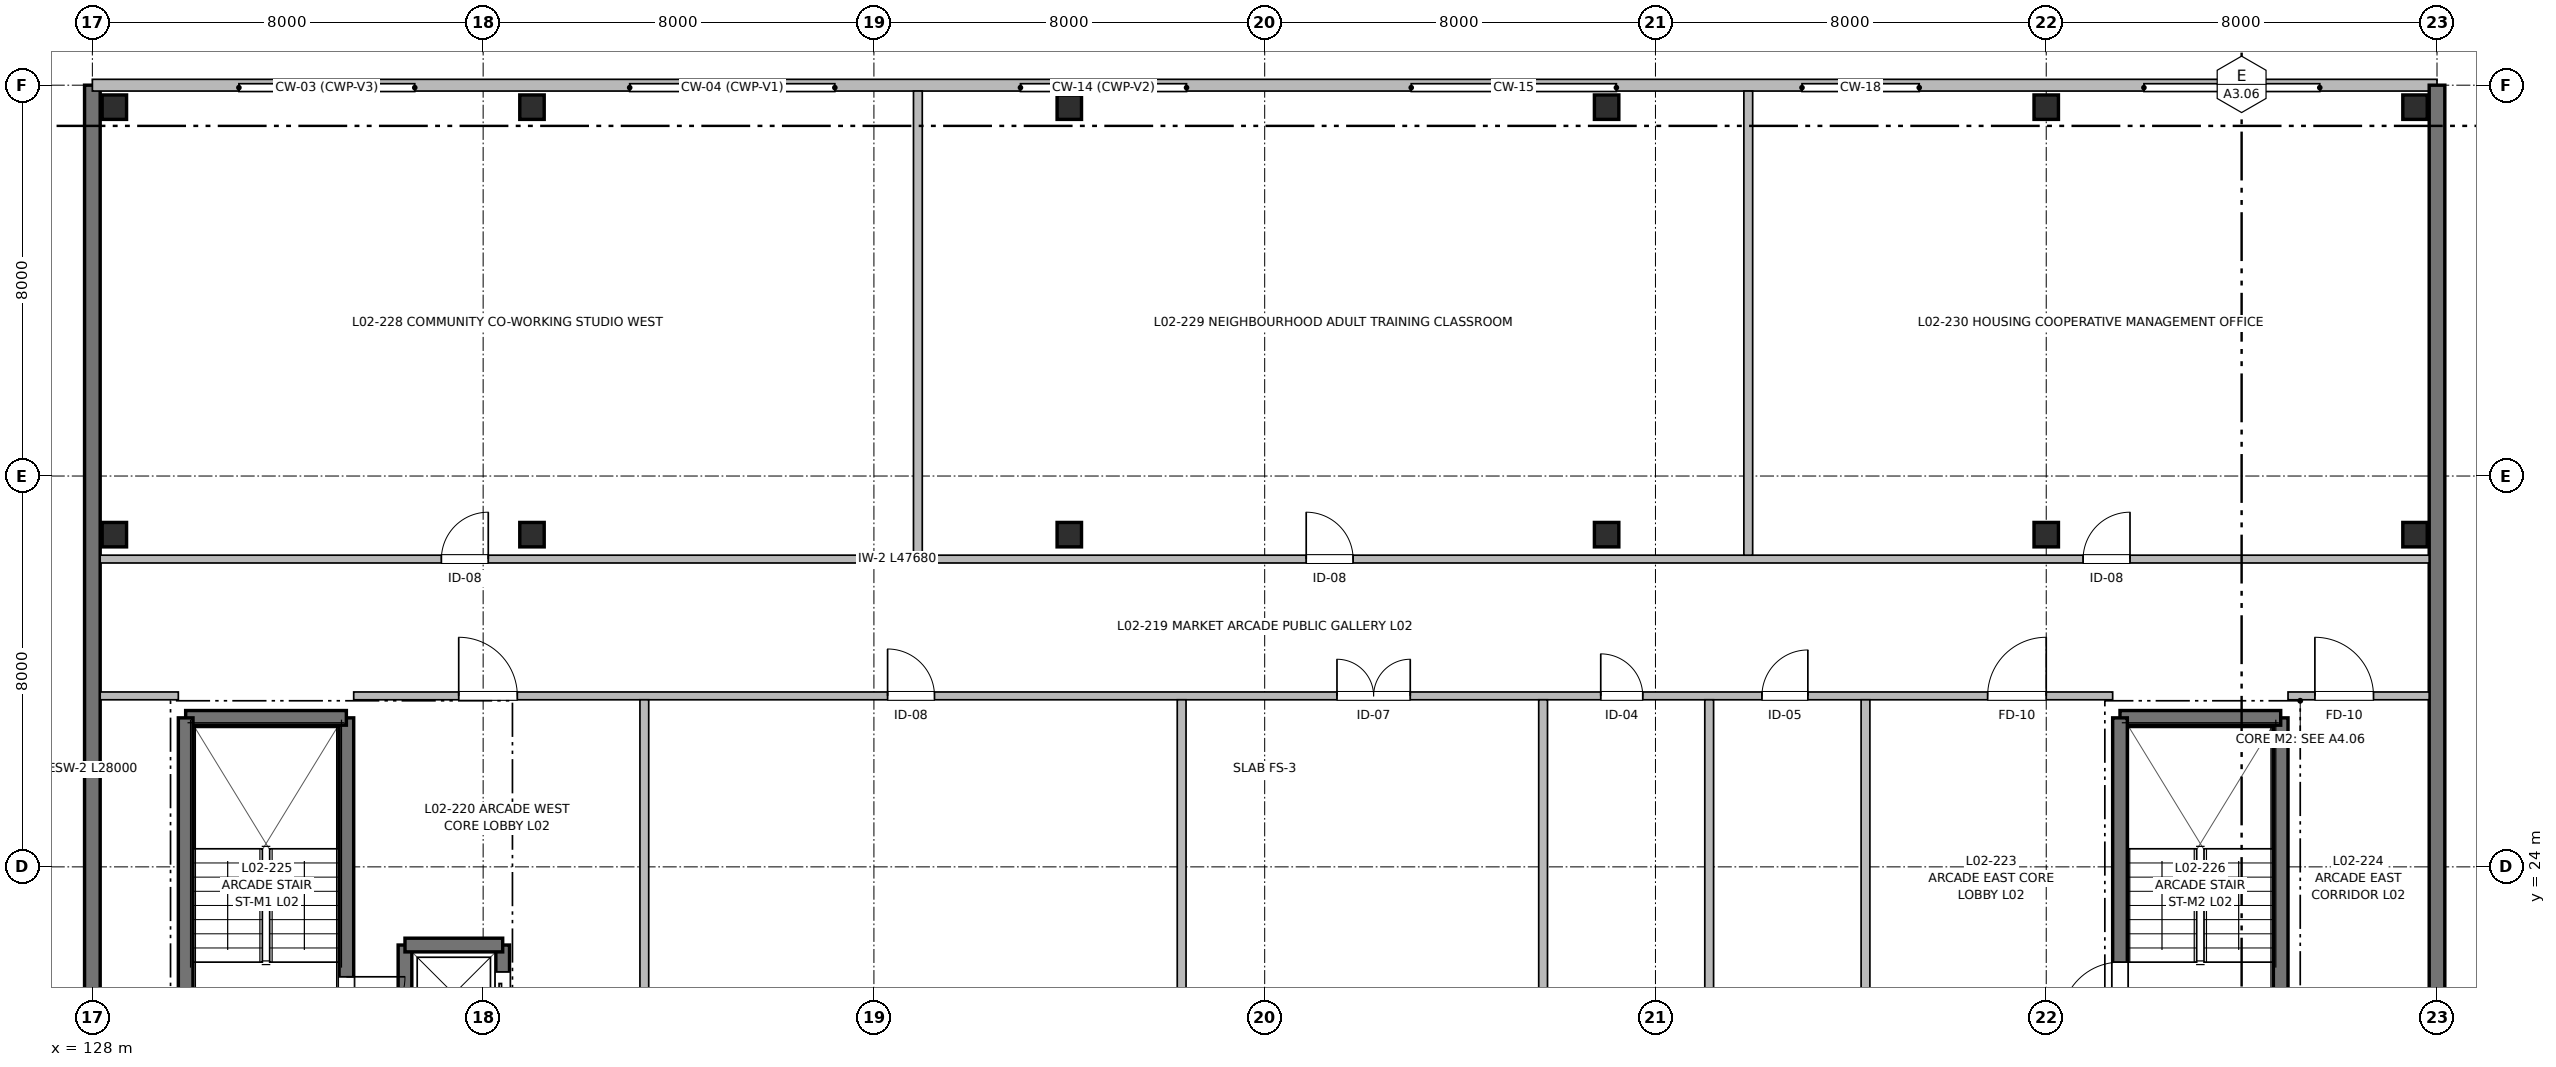
"""IFC4 building model, lengths in metres.
Left out: names, types, materials, properties, quantities, classifications, styles, units other than length and angle.
Written with IfcOpenShell. Run it as: python <this file> out.ifc"""

import sys

from ifc_helpers import new_model, si_unit, direction, frame, frame_2d, origin, origin_2d, place, context, subcontext, project, spatial, rectangle, extrude, element, fill, save


model = new_model("IFC4")
c1 = context("Model", 3, precision=1e-05, world=origin(), true_north=direction((0.0, 1.0)))
c2 = subcontext(c1, "Body", "Model", "MODEL_VIEW")
j1 = project(units=[si_unit("LENGTHUNIT", "METRE"), si_unit("PLANEANGLEUNIT", "RADIAN")], contexts=[c1])
p1 = place(None, origin())
s1 = spatial("IfcSite", under=j1, at=p1, CompositionType="ELEMENT")
p2 = place(p1, origin())
s2 = spatial("IfcBuilding", under=s1, at=p2, CompositionType="ELEMENT")
p3 = place(p2, frame((0.0, 0.0, 7.36)))
s3 = spatial("IfcBuildingStorey", under=s2, at=p3, CompositionType="ELEMENT", Elevation=7.36)
for number, where, z_axis, x_axis in (
    (1, (128.45, 30.8, 0.0), (0.0, 0.0, 1.0), (1.0, 0.0, 0.0)),
    (2, (128.45, 39.55, 0.0), (0.0, 0.0, 1.0), (1.0, 0.0, 0.0)),
    (3, (137.0, 30.8, 0.0), (0.0, 0.0, 1.0), (1.0, 0.0, 0.0)),
    (4, (137.0, 39.55, 0.0), (0.0, 0.0, 1.0), (1.0, 0.0, 0.0)),
    (5, (148.0, 30.8, 0.0), (0.0, 0.0, 1.0), (1.0, 0.0, 0.0)),
    (6, (148.0, 39.55, 0.0), (0.0, 0.0, 1.0), (1.0, 0.0, 0.0)),
    (7, (159.0, 30.8, 0.0), (0.0, 0.0, 1.0), (1.0, 0.0, 0.0)),
    (8, (159.0, 39.55, 0.0), (0.0, 0.0, 1.0), (1.0, 0.0, 0.0)),
    (9, (168.0, 30.8, 0.0), (0.0, 0.0, 1.0), (1.0, 0.0, 0.0)),
    (10, (168.0, 39.55, 0.0), (0.0, 0.0, 1.0), (1.0, 0.0, 0.0)),
    (11, (175.55, 30.8, 0.0), (0.0, 0.0, 1.0), (1.0, 0.0, 0.0)),
    (12, (175.55, 39.55, 0.0), (0.0, 0.0, 1.0), (1.0, 0.0, 0.0)),
):
    element("IfcColumn", number, at=place(p3, frame(where, z_axis=z_axis, x_axis=x_axis)), inside=s3, PredefinedType="COLUMN", context=c2, shape_type="SweptSolid", body=[
        extrude(rectangle(XDim=0.5, YDim=0.5, at=origin_2d()), origin(), (0.0, 0.0, 1.0), 3.2),
    ])
p4 = place(p3, frame((128.0, 12.0, 0.0), z_axis=(0.0, 0.0, 1.0), x_axis=(0.0, 1.0, 0.0)))
e13 = element("IfcWall", 13, at=p4, inside=s3, PredefinedType="SHEAR", context=c2, shape_type="SweptSolid", body=[
    extrude(rectangle(XDim=28.0, YDim=0.32, at=frame_2d((14.0, 0.0))), origin(), (0.0, 0.0, 1.0), 2.95),
])
p5 = place(p3, frame((128.0, 40.0, 0.0), z_axis=(0.0, 0.0, 1.0), x_axis=(1.0, 0.0, 0.0)))
e14 = element("IfcWall", 14, at=p5, inside=s3, PredefinedType="SOLIDWALL", context=c2, shape_type="SweptSolid", body=[
    extrude(rectangle(XDim=48.0, YDim=0.24, at=frame_2d((24.0, 0.0))), origin(), (0.0, 0.0, 1.0), 2.95),
])
p6 = place(p3, frame((176.0, 40.0, 0.0), z_axis=(0.0, 0.0, 1.0), x_axis=(0.0, -1.0, 0.0)))
e15 = element("IfcWall", 15, at=p6, inside=s3, PredefinedType="SHEAR", context=c2, shape_type="SweptSolid", body=[
    extrude(rectangle(XDim=28.0, YDim=0.32, at=frame_2d((14.0, 0.0))), origin(), (0.0, 0.0, 1.0), 2.95),
])
p7 = place(p3, frame((136.4, 20.4, 0.0), z_axis=(0.0, 0.0, 1.0), x_axis=(0.0, 1.0, 0.0)))
e16 = element("IfcWall", 16, at=p7, inside=s3, PredefinedType="SHEAR", context=c2, shape_type="SweptSolid", body=[
    extrude(rectangle(XDim=2.0, YDim=0.28, at=frame_2d((1.0, 0.0))), origin(), (0.0, 0.0, 1.0), 2.95),
])
p8 = place(p7, frame((0.5, 0.0, 0.0)))
e17 = element("IfcOpeningElement", 17, at=p8, cuts=e16, PredefinedType="OPENING", context=c2, shape_type="SweptSolid", body=[
    extrude(rectangle(XDim=0.95, YDim=2.15, at=frame_2d((0.475, 1.075))), frame((0.0, 0.15, 0.0), z_axis=(0.0, -1.0, 0.0), x_axis=(1.0, 0.0, 0.0)), (0.0, 0.0, 1.0), 0.3),
])
for number, where, z_axis, x_axis in (
    (18, (134.4, 20.4, 0.0), (0.0, 0.0, 1.0), (0.0, 1.0, 0.0)),
    (19, (134.4, 22.4, 0.0), (0.0, 0.0, 1.0), (1.0, 0.0, 0.0)),
):
    element("IfcWall", number, at=place(p3, frame(where, z_axis=z_axis, x_axis=x_axis)), inside=s3, PredefinedType="SHEAR", context=c2, shape_type="SweptSolid", body=[
        extrude(rectangle(XDim=2.0, YDim=0.28, at=frame_2d((1.0, 0.0))), origin(), (0.0, 0.0, 1.0), 2.95),
    ])
p9 = place(p3, frame((133.2, 27.05, 0.0), z_axis=(0.0, 0.0, 1.0), x_axis=(0.0, -1.0, 0.0)))
e20 = element("IfcWall", 20, at=p9, inside=s3, PredefinedType="SHEAR", context=c2, shape_type="SweptSolid", body=[
    extrude(rectangle(XDim=6.9, YDim=0.3, at=frame_2d((3.45, 0.0))), origin(), (0.0, 0.0, 1.0), 3.2),
])
p10 = place(p9, frame((5.3, 0.0, 0.0)))
e21 = element("IfcOpeningElement", 21, at=p10, cuts=e20, PredefinedType="OPENING", context=c2, shape_type="SweptSolid", body=[
    extrude(rectangle(XDim=1.2, YDim=2.2, at=frame_2d((0.6, 1.1))), frame((0.0, 0.16, 0.0), z_axis=(0.0, -1.0, 0.0), x_axis=(1.0, 0.0, 0.0)), (0.0, 0.0, 1.0), 0.32),
])
p11 = place(p3, frame((129.91, 27.05, 0.0), z_axis=(0.0, 0.0, 1.0), x_axis=(1.0, 0.0, 0.0)))
e22 = element("IfcWall", 22, at=p11, inside=s3, PredefinedType="SHEAR", context=c2, shape_type="SweptSolid", body=[
    extrude(rectangle(XDim=3.29, YDim=0.3, at=frame_2d((1.645, 0.0))), origin(), (0.0, 0.0, 1.0), 3.2),
])
for number, where, z_axis, x_axis in (
    (23, (129.91, 20.15, 0.0), (0.0, 0.0, 1.0), (0.0, 1.0, 0.0)),
    (24, (172.8, 27.05, 0.0), (0.0, 0.0, 1.0), (0.0, -1.0, 0.0)),
):
    element("IfcWall", number, at=place(p3, frame(where, z_axis=z_axis, x_axis=x_axis)), inside=s3, PredefinedType="SHEAR", context=c2, shape_type="SweptSolid", body=[
        extrude(rectangle(XDim=6.9, YDim=0.3, at=frame_2d((3.45, 0.0))), origin(), (0.0, 0.0, 1.0), 3.2),
    ])
p12 = place(p3, frame((169.51, 27.05, 0.0), z_axis=(0.0, 0.0, 1.0), x_axis=(1.0, 0.0, 0.0)))
e25 = element("IfcWall", 25, at=p12, inside=s3, PredefinedType="SHEAR", context=c2, shape_type="SweptSolid", body=[
    extrude(rectangle(XDim=3.29, YDim=0.3, at=frame_2d((1.645, 0.0))), origin(), (0.0, 0.0, 1.0), 3.2),
])
p13 = place(p3, frame((169.51, 20.15, 0.0), z_axis=(0.0, 0.0, 1.0), x_axis=(0.0, 1.0, 0.0)))
e26 = element("IfcWall", 26, at=p13, inside=s3, PredefinedType="SHEAR", context=c2, shape_type="SweptSolid", body=[
    extrude(rectangle(XDim=6.9, YDim=0.3, at=frame_2d((3.45, 0.0))), origin(), (0.0, 0.0, 1.0), 3.2),
])
p14 = place(p13, frame((0.7, 0.0, 0.0)))
e27 = element("IfcOpeningElement", 27, at=p14, cuts=e26, PredefinedType="OPENING", context=c2, shape_type="SweptSolid", body=[
    extrude(rectangle(XDim=1.2, YDim=2.2, at=frame_2d((0.6, 1.1))), frame((0.0, 0.16, 0.0), z_axis=(0.0, -1.0, 0.0), x_axis=(1.0, 0.0, 0.0)), (0.0, 0.0, 1.0), 0.32),
])
p15 = place(p3, frame((128.16, 27.5, 0.0), z_axis=(0.0, 0.0, 1.0), x_axis=(1.0, 0.0, 0.0)))
e28 = element("IfcWall", 28, at=p15, inside=s3, PredefinedType="PARTITIONING", context=c2, shape_type="SweptSolid", body=[
    extrude(rectangle(XDim=1.6, YDim=0.16, at=frame_2d((0.8, 0.0))), origin(), (0.0, 0.0, 1.0), 2.93),
])
p16 = place(p3, frame((133.35, 27.5, 0.0), z_axis=(0.0, 0.0, 1.0), x_axis=(1.0, 0.0, 0.0)))
e29 = element("IfcWall", 29, at=p16, inside=s3, PredefinedType="PARTITIONING", context=c2, shape_type="SweptSolid", body=[
    extrude(rectangle(XDim=36.01, YDim=0.16, at=frame_2d((18.005, 0.0))), origin(), (0.0, 0.0, 1.0), 2.93),
])
p17 = place(p16, frame((2.15, 0.0, 0.0)))
e30 = element("IfcOpeningElement", 30, at=p17, cuts=e29, PredefinedType="OPENING", context=c2, shape_type="SweptSolid", body=[
    extrude(rectangle(XDim=1.2, YDim=2.2, at=frame_2d((0.6, 1.1))), frame((0.0, 0.09, 0.0), z_axis=(0.0, -1.0, 0.0), x_axis=(1.0, 0.0, 0.0)), (0.0, 0.0, 1.0), 0.18),
])
p18 = place(p16, frame((33.45, 0.0, 0.0)))
e31 = element("IfcOpeningElement", 31, at=p18, cuts=e29, PredefinedType="OPENING", context=c2, shape_type="SweptSolid", body=[
    extrude(rectangle(XDim=1.2, YDim=2.2, at=frame_2d((0.6, 1.1))), frame((0.0, 0.09, 0.0), z_axis=(0.0, -1.0, 0.0), x_axis=(1.0, 0.0, 0.0)), (0.0, 0.0, 1.0), 0.18),
])
p19 = place(p16, frame((10.93, 0.0, 0.0)))
e32 = element("IfcOpeningElement", 32, at=p19, cuts=e29, PredefinedType="OPENING", context=c2, shape_type="SweptSolid", body=[
    extrude(rectangle(XDim=0.96, YDim=2.15, at=frame_2d((0.48, 1.075))), frame((0.0, 0.09, 0.0), z_axis=(0.0, -1.0, 0.0), x_axis=(1.0, 0.0, 0.0)), (0.0, 0.0, 1.0), 0.18),
])
p20 = place(p16, frame((20.13, 0.0, 0.0)))
e33 = element("IfcOpeningElement", 33, at=p20, cuts=e29, PredefinedType="OPENING", context=c2, shape_type="SweptSolid", body=[
    extrude(rectangle(XDim=1.5, YDim=2.2, at=frame_2d((0.75, 1.1))), frame((0.0, 0.09, 0.0), z_axis=(0.0, -1.0, 0.0), x_axis=(1.0, 0.0, 0.0)), (0.0, 0.0, 1.0), 0.18),
])
p21 = place(p16, frame((25.53, 0.0, 0.0)))
e34 = element("IfcOpeningElement", 34, at=p21, cuts=e29, PredefinedType="OPENING", context=c2, shape_type="SweptSolid", body=[
    extrude(rectangle(XDim=0.86, YDim=2.1, at=frame_2d((0.43, 1.05))), frame((0.0, 0.09, 0.0), z_axis=(0.0, -1.0, 0.0), x_axis=(1.0, 0.0, 0.0)), (0.0, 0.0, 1.0), 0.18),
])
p22 = place(p16, frame((28.83, 0.0, 0.0)))
e35 = element("IfcOpeningElement", 35, at=p22, cuts=e29, PredefinedType="OPENING", context=c2, shape_type="SweptSolid", body=[
    extrude(rectangle(XDim=0.94, YDim=2.1, at=frame_2d((0.47, 1.05))), frame((0.0, 0.09, 0.0), z_axis=(0.0, -1.0, 0.0), x_axis=(1.0, 0.0, 0.0)), (0.0, 0.0, 1.0), 0.18),
])
p23 = place(p3, frame((172.95, 27.5, 0.0), z_axis=(0.0, 0.0, 1.0), x_axis=(1.0, 0.0, 0.0)))
e36 = element("IfcWall", 36, at=p23, inside=s3, PredefinedType="PARTITIONING", context=c2, shape_type="SweptSolid", body=[
    extrude(rectangle(XDim=2.89, YDim=0.16, at=frame_2d((1.445, 0.0))), origin(), (0.0, 0.0, 1.0), 2.93),
])
p24 = place(p23, frame((0.55, 0.0, 0.0)))
e37 = element("IfcOpeningElement", 37, at=p24, cuts=e36, PredefinedType="OPENING", context=c2, shape_type="SweptSolid", body=[
    extrude(rectangle(XDim=1.2, YDim=2.2, at=frame_2d((0.6, 1.1))), frame((0.0, 0.09, 0.0), z_axis=(0.0, -1.0, 0.0), x_axis=(1.0, 0.0, 0.0)), (0.0, 0.0, 1.0), 0.18),
])
p25 = place(p3, frame((128.16, 30.3, 0.0), z_axis=(0.0, 0.0, 1.0), x_axis=(1.0, 0.0, 0.0)))
e38 = element("IfcWall", 38, at=p25, inside=s3, PredefinedType="PARTITIONING", context=c2, shape_type="SweptSolid", body=[
    extrude(rectangle(XDim=47.68, YDim=0.16, at=frame_2d((23.84, 0.0))), origin(), (0.0, 0.0, 1.0), 2.93),
])
p26 = place(p25, frame((6.985, 0.0, 0.0)))
e39 = element("IfcOpeningElement", 39, at=p26, cuts=e38, PredefinedType="OPENING", context=c2, shape_type="SweptSolid", body=[
    extrude(rectangle(XDim=0.96, YDim=2.15, at=frame_2d((0.48, 1.075))), frame((0.0, 0.09, 0.0), z_axis=(0.0, -1.0, 0.0), x_axis=(1.0, 0.0, 0.0)), (0.0, 0.0, 1.0), 0.18),
])
p27 = place(p25, frame((24.69, 0.0, 0.0)))
e40 = element("IfcOpeningElement", 40, at=p27, cuts=e38, PredefinedType="OPENING", context=c2, shape_type="SweptSolid", body=[
    extrude(rectangle(XDim=0.96, YDim=2.15, at=frame_2d((0.48, 1.075))), frame((0.0, 0.09, 0.0), z_axis=(0.0, -1.0, 0.0), x_axis=(1.0, 0.0, 0.0)), (0.0, 0.0, 1.0), 0.18),
])
p28 = place(p25, frame((40.595, 0.0, 0.0)))
e41 = element("IfcOpeningElement", 41, at=p28, cuts=e38, PredefinedType="OPENING", context=c2, shape_type="SweptSolid", body=[
    extrude(rectangle(XDim=0.96, YDim=2.15, at=frame_2d((0.48, 1.075))), frame((0.0, 0.09, 0.0), z_axis=(0.0, -1.0, 0.0), x_axis=(1.0, 0.0, 0.0)), (0.0, 0.0, 1.0), 0.18),
])
for number, where, z_axis, x_axis in (
    (42, (139.3, 12.2, 0.0), (0.0, 0.0, 1.0), (0.0, 1.0, 0.0)),
    (43, (164.3, 12.2, 0.0), (0.0, 0.0, 1.0), (0.0, 1.0, 0.0)),
):
    element("IfcWall", number, at=place(p3, frame(where, z_axis=z_axis, x_axis=x_axis)), inside=s3, PredefinedType="PARTITIONING", context=c2, shape_type="SweptSolid", body=[
        extrude(rectangle(XDim=15.22, YDim=0.18, at=frame_2d((7.61, 0.0))), origin(), (0.0, 0.0, 1.0), 2.93),
    ])
for number, where, z_axis, x_axis in (
    (44, (144.9, 30.38, 0.0), (0.0, 0.0, 1.0), (0.0, 1.0, 0.0)),
    (45, (161.9, 30.38, 0.0), (0.0, 0.0, 1.0), (0.0, 1.0, 0.0)),
):
    element("IfcWall", number, at=place(p3, frame(where, z_axis=z_axis, x_axis=x_axis)), inside=s3, PredefinedType="PARTITIONING", context=c2, shape_type="SweptSolid", body=[
        extrude(rectangle(XDim=9.5, YDim=0.18, at=frame_2d((4.75, 0.0))), origin(), (0.0, 0.0, 1.0), 2.93),
    ])
for number, where, z_axis, x_axis in (
    (46, (150.3, 12.2, 0.0), (0.0, 0.0, 1.0), (0.0, 1.0, 0.0)),
    (47, (157.7, 12.2, 0.0), (0.0, 0.0, 1.0), (0.0, 1.0, 0.0)),
    (48, (161.1, 12.2, 0.0), (0.0, 0.0, 1.0), (0.0, 1.0, 0.0)),
):
    element("IfcWall", number, at=place(p3, frame(where, z_axis=z_axis, x_axis=x_axis)), inside=s3, PredefinedType="PARTITIONING", context=c2, shape_type="SweptSolid", body=[
        extrude(rectangle(XDim=15.22, YDim=0.18, at=frame_2d((7.61, 0.0))), origin(), (0.0, 0.0, 1.0), 2.93),
    ])
p29 = place(p8, origin())
e49 = element("IfcDoor", 49, at=p29, inside=s3, OperationType="SLIDING_TO_LEFT", PredefinedType="DOOR", context=c2, shape_type="SweptSolid", body=[
    extrude(rectangle(XDim=0.95, YDim=2.15, at=frame_2d((0.475, 1.075))), frame((0.0, 0.025, 0.0), z_axis=(0.0, -1.0, 0.0), x_axis=(1.0, 0.0, 0.0)), (0.0, 0.0, 1.0), 0.05),
])
fill(e17, e49)
p30 = place(p10, origin())
e50 = element("IfcDoor", 50, at=p30, inside=s3, OperationType="SINGLE_SWING_LEFT", PredefinedType="DOOR", context=c2, shape_type="SweptSolid", body=[
    extrude(rectangle(XDim=1.2, YDim=2.2, at=frame_2d((0.6, 1.1))), frame((0.0, 0.025, 0.0), z_axis=(0.0, -1.0, 0.0), x_axis=(1.0, 0.0, 0.0)), (0.0, 0.0, 1.0), 0.05),
])
fill(e21, e50)
p31 = place(p14, origin())
e51 = element("IfcDoor", 51, at=p31, inside=s3, OperationType="SINGLE_SWING_LEFT", PredefinedType="DOOR", context=c2, shape_type="SweptSolid", body=[
    extrude(rectangle(XDim=1.2, YDim=2.2, at=frame_2d((0.6, 1.1))), frame((0.0, 0.025, 0.0), z_axis=(0.0, -1.0, 0.0), x_axis=(1.0, 0.0, 0.0)), (0.0, 0.0, 1.0), 0.05),
])
fill(e27, e51)
p32 = place(p17, origin())
e52 = element("IfcDoor", 52, at=p32, inside=s3, OperationType="SINGLE_SWING_LEFT", PredefinedType="DOOR", context=c2, shape_type="SweptSolid", body=[
    extrude(rectangle(XDim=1.2, YDim=2.2, at=frame_2d((0.6, 1.1))), frame((0.0, 0.025, 0.0), z_axis=(0.0, -1.0, 0.0), x_axis=(1.0, 0.0, 0.0)), (0.0, 0.0, 1.0), 0.05),
])
fill(e30, e52)
p33 = place(p18, origin())
e53 = element("IfcDoor", 53, at=p33, inside=s3, OperationType="SINGLE_SWING_RIGHT", PredefinedType="DOOR", context=c2, shape_type="SweptSolid", body=[
    extrude(rectangle(XDim=1.2, YDim=2.2, at=frame_2d((0.6, 1.1))), frame((0.0, 0.025, 0.0), z_axis=(0.0, -1.0, 0.0), x_axis=(1.0, 0.0, 0.0)), (0.0, 0.0, 1.0), 0.05),
])
fill(e31, e53)
p34 = place(p24, origin())
e54 = element("IfcDoor", 54, at=p34, inside=s3, OperationType="SINGLE_SWING_LEFT", PredefinedType="DOOR", context=c2, shape_type="SweptSolid", body=[
    extrude(rectangle(XDim=1.2, YDim=2.2, at=frame_2d((0.6, 1.1))), frame((0.0, 0.025, 0.0), z_axis=(0.0, -1.0, 0.0), x_axis=(1.0, 0.0, 0.0)), (0.0, 0.0, 1.0), 0.05),
])
fill(e37, e54)
p35 = place(p26, origin())
e55 = element("IfcDoor", 55, at=p35, inside=s3, OperationType="SINGLE_SWING_RIGHT", PredefinedType="DOOR", context=c2, shape_type="SweptSolid", body=[
    extrude(rectangle(XDim=0.96, YDim=2.15, at=frame_2d((0.48, 1.075))), frame((0.0, 0.025, 0.0), z_axis=(0.0, -1.0, 0.0), x_axis=(1.0, 0.0, 0.0)), (0.0, 0.0, 1.0), 0.05),
])
fill(e39, e55)
p36 = place(p27, origin())
e56 = element("IfcDoor", 56, at=p36, inside=s3, OperationType="SINGLE_SWING_LEFT", PredefinedType="DOOR", context=c2, shape_type="SweptSolid", body=[
    extrude(rectangle(XDim=0.96, YDim=2.15, at=frame_2d((0.48, 1.075))), frame((0.0, 0.025, 0.0), z_axis=(0.0, -1.0, 0.0), x_axis=(1.0, 0.0, 0.0)), (0.0, 0.0, 1.0), 0.05),
])
fill(e40, e56)
p37 = place(p28, origin())
e57 = element("IfcDoor", 57, at=p37, inside=s3, OperationType="SINGLE_SWING_RIGHT", PredefinedType="DOOR", context=c2, shape_type="SweptSolid", body=[
    extrude(rectangle(XDim=0.96, YDim=2.15, at=frame_2d((0.48, 1.075))), frame((0.0, 0.025, 0.0), z_axis=(0.0, -1.0, 0.0), x_axis=(1.0, 0.0, 0.0)), (0.0, 0.0, 1.0), 0.05),
])
fill(e41, e57)
p38 = place(p19, origin())
e58 = element("IfcDoor", 58, at=p38, inside=s3, OperationType="SINGLE_SWING_LEFT", PredefinedType="DOOR", context=c2, shape_type="SweptSolid", body=[
    extrude(rectangle(XDim=0.96, YDim=2.15, at=frame_2d((0.48, 1.075))), frame((0.0, 0.025, 0.0), z_axis=(0.0, -1.0, 0.0), x_axis=(1.0, 0.0, 0.0)), (0.0, 0.0, 1.0), 0.05),
])
fill(e32, e58)
p39 = place(p20, origin())
e59 = element("IfcDoor", 59, at=p39, inside=s3, OperationType="DOUBLE_DOOR_SINGLE_SWING", PredefinedType="DOOR", context=c2, shape_type="SweptSolid", body=[
    extrude(rectangle(XDim=1.5, YDim=2.2, at=frame_2d((0.75, 1.1))), frame((0.0, 0.025, 0.0), z_axis=(0.0, -1.0, 0.0), x_axis=(1.0, 0.0, 0.0)), (0.0, 0.0, 1.0), 0.05),
])
fill(e33, e59)
p40 = place(p21, origin())
e60 = element("IfcDoor", 60, at=p40, inside=s3, OperationType="SINGLE_SWING_LEFT", PredefinedType="DOOR", context=c2, shape_type="SweptSolid", body=[
    extrude(rectangle(XDim=0.86, YDim=2.1, at=frame_2d((0.43, 1.05))), frame((0.0, 0.025, 0.0), z_axis=(0.0, -1.0, 0.0), x_axis=(1.0, 0.0, 0.0)), (0.0, 0.0, 1.0), 0.05),
])
fill(e34, e60)
p41 = place(p22, origin())
e61 = element("IfcDoor", 61, at=p41, inside=s3, OperationType="SINGLE_SWING_RIGHT", PredefinedType="DOOR", context=c2, shape_type="SweptSolid", body=[
    extrude(rectangle(XDim=0.94, YDim=2.1, at=frame_2d((0.47, 1.05))), frame((0.0, 0.025, 0.0), z_axis=(0.0, -1.0, 0.0), x_axis=(1.0, 0.0, 0.0)), (0.0, 0.0, 1.0), 0.05),
])
fill(e35, e61)
save(model, sys.argv[1])
